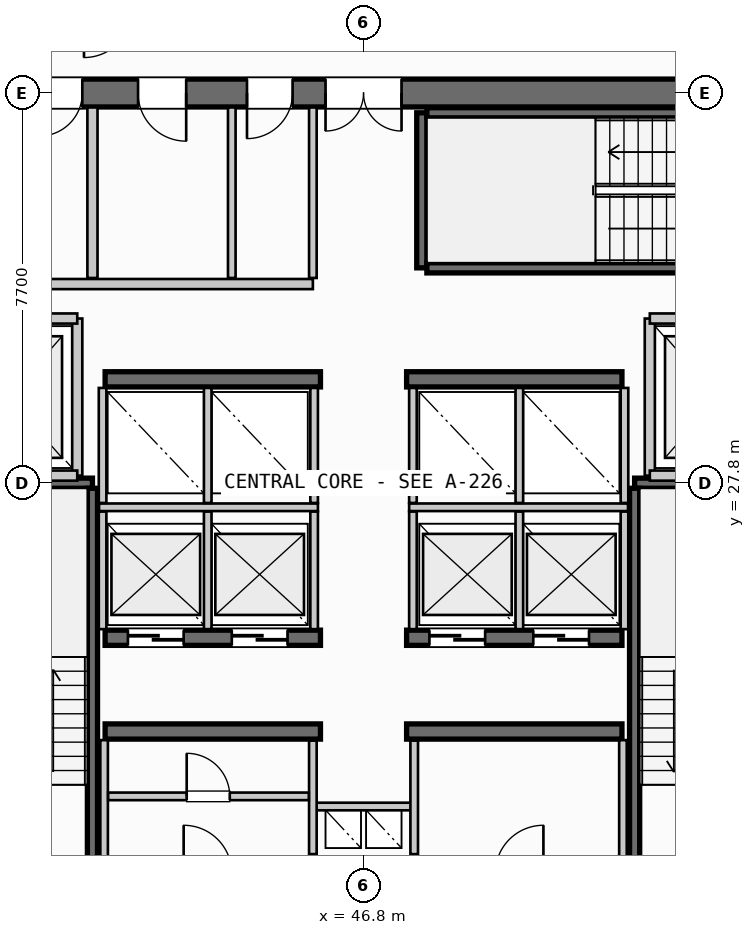
"""IFC4 building model, lengths in metres.
Left out: names, types, materials, properties, quantities, classifications, styles, units other than length and angle.
Written with IfcOpenShell. Run it as: python <this file> out.ifc"""

import sys

from ifc_helpers import new_model, si_unit, direction, frame, frame_2d, origin, place, context, subcontext, project, spatial, rectangle, extrude, source, transform, mapped, element, fill, save


model = new_model("IFC4")
c1 = context("Model", 3, precision=1e-05, world=origin(), true_north=direction((0.0, 1.0)))
c2 = subcontext(c1, "Body", "Model", "MODEL_VIEW")
j1 = project(units=[si_unit("LENGTHUNIT", "METRE"), si_unit("PLANEANGLEUNIT", "RADIAN")], contexts=[c1])
p1 = place(None, origin())
s1 = spatial("IfcSite", under=j1, at=p1, CompositionType="ELEMENT")
p2 = place(p1, origin())
s2 = spatial("IfcBuilding", under=s1, at=p2, CompositionType="ELEMENT")
p3 = place(p2, frame((0.0, 0.0, 186.9)))
s3 = spatial("IfcBuildingStorey", under=s2, at=p3, CompositionType="ELEMENT", Elevation=186.9)
p4 = place(p3, frame((55.6, 35.5, 0.0), z_axis=(0.0, 0.0, 1.0), x_axis=(-1.0, 0.0, 0.0)))
e1 = element("IfcWall", 1, at=p4, inside=s3, PredefinedType="SHEAR", context=c2, shape_type="SweptSolid", body=[
    extrude(rectangle(XDim=17.6, YDim=0.55, at=frame_2d((8.8, 0.0))), origin(), (0.0, 0.0, 1.0), 3.26),
])
p5 = place(p4, frame((8.05, 0.0, 0.0)))
e2 = element("IfcOpeningElement", 2, at=p5, cuts=e1, PredefinedType="OPENING", context=c2, shape_type="SweptSolid", body=[
    extrude(rectangle(XDim=1.5, YDim=2.2, at=frame_2d((0.75, 1.1))), frame((0.0, 0.285, 0.0), z_axis=(0.0, -1.0, 0.0), x_axis=(1.0, 0.0, 0.0)), (0.0, 0.0, 1.0), 0.57),
])
p6 = place(p4, frame((15.85, 0.0, 0.0)))
e3 = element("IfcOpeningElement", 3, at=p6, cuts=e1, PredefinedType="OPENING", context=c2, shape_type="SweptSolid", body=[
    extrude(rectangle(XDim=0.85, YDim=2.15, at=frame_2d((0.425, 1.075))), frame((0.0, 0.285, 0.0), z_axis=(0.0, -1.0, 0.0), x_axis=(1.0, 0.0, 0.0)), (0.0, 0.0, 1.0), 0.57),
])
p7 = place(p4, frame((14.35, 0.0, 0.0)))
e4 = element("IfcOpeningElement", 4, at=p7, cuts=e1, PredefinedType="OPENING", context=c2, shape_type="SweptSolid", body=[
    extrude(rectangle(XDim=0.85, YDim=2.15, at=frame_2d((0.425, 1.075))), frame((0.0, 0.285, 0.0), z_axis=(0.0, -1.0, 0.0), x_axis=(1.0, 0.0, 0.0)), (0.0, 0.0, 1.0), 0.57),
])
p8 = place(p4, frame((12.3, 0.0, 0.0)))
e5 = element("IfcOpeningElement", 5, at=p8, cuts=e1, PredefinedType="OPENING", context=c2, shape_type="SweptSolid", body=[
    extrude(rectangle(XDim=0.95, YDim=2.15, at=frame_2d((0.475, 1.075))), frame((0.0, 0.285, 0.0), z_axis=(0.0, -1.0, 0.0), x_axis=(1.0, 0.0, 0.0)), (0.0, 0.0, 1.0), 0.57),
])
p9 = place(p4, frame((10.2, 0.0, 0.0)))
e6 = element("IfcOpeningElement", 6, at=p9, cuts=e1, PredefinedType="OPENING", context=c2, shape_type="SweptSolid", body=[
    extrude(rectangle(XDim=0.9, YDim=2.15, at=frame_2d((0.45, 1.075))), frame((0.0, 0.285, 0.0), z_axis=(0.0, -1.0, 0.0), x_axis=(1.0, 0.0, 0.0)), (0.0, 0.0, 1.0), 0.57),
])
for number, where, z_axis, x_axis in (
    (7, (41.7, 22.9, 0.0), (0.0, 0.0, 1.0), (1.0, 0.0, 0.0)),
    (8, (47.65, 22.9, 0.0), (0.0, 0.0, 1.0), (1.0, 0.0, 0.0)),
):
    element("IfcWall", number, at=place(p3, frame(where, z_axis=z_axis, x_axis=x_axis)), inside=s3, PredefinedType="SHEAR", context=c2, shape_type="SweptSolid", body=[
        extrude(rectangle(XDim=4.25, YDim=0.3, at=frame_2d((2.125, 0.0))), origin(), (0.0, 0.0, 1.0), 3.26),
    ])
p10 = place(p3, frame((41.7, 24.75, 0.0), z_axis=(0.0, 0.0, 1.0), x_axis=(1.0, 0.0, 0.0)))
e9 = element("IfcWall", 9, at=p10, inside=s3, PredefinedType="SHEAR", context=c2, shape_type="SweptSolid", body=[
    extrude(rectangle(XDim=4.25, YDim=0.3, at=frame_2d((2.125, 0.0))), origin(), (0.0, 0.0, 1.0), 3.26),
])
p11 = place(p10, frame((0.45, 0.0, 0.0)))
e10 = element("IfcOpeningElement", 10, at=p11, cuts=e9, PredefinedType="OPENING", context=c2, shape_type="SweptSolid", body=[
    extrude(rectangle(XDim=1.1, YDim=2.2, at=frame_2d((0.55, 1.1))), frame((0.0, 0.16, 0.0), z_axis=(0.0, -1.0, 0.0), x_axis=(1.0, 0.0, 0.0)), (0.0, 0.0, 1.0), 0.32),
])
p12 = place(p10, frame((2.5, 0.0, 0.0)))
e11 = element("IfcOpeningElement", 11, at=p12, cuts=e9, PredefinedType="OPENING", context=c2, shape_type="SweptSolid", body=[
    extrude(rectangle(XDim=1.1, YDim=2.2, at=frame_2d((0.55, 1.1))), frame((0.0, 0.16, 0.0), z_axis=(0.0, -1.0, 0.0), x_axis=(1.0, 0.0, 0.0)), (0.0, 0.0, 1.0), 0.32),
])
p13 = place(p3, frame((47.65, 24.75, 0.0), z_axis=(0.0, 0.0, 1.0), x_axis=(1.0, 0.0, 0.0)))
e12 = element("IfcWall", 12, at=p13, inside=s3, PredefinedType="SHEAR", context=c2, shape_type="SweptSolid", body=[
    extrude(rectangle(XDim=4.25, YDim=0.3, at=frame_2d((2.125, 0.0))), origin(), (0.0, 0.0, 1.0), 3.26),
])
p14 = place(p13, frame((0.45, 0.0, 0.0)))
e13 = element("IfcOpeningElement", 13, at=p14, cuts=e12, PredefinedType="OPENING", context=c2, shape_type="SweptSolid", body=[
    extrude(rectangle(XDim=1.1, YDim=2.2, at=frame_2d((0.55, 1.1))), frame((0.0, 0.16, 0.0), z_axis=(0.0, -1.0, 0.0), x_axis=(1.0, 0.0, 0.0)), (0.0, 0.0, 1.0), 0.32),
])
p15 = place(p13, frame((2.5, 0.0, 0.0)))
e14 = element("IfcOpeningElement", 14, at=p15, cuts=e12, PredefinedType="OPENING", context=c2, shape_type="SweptSolid", body=[
    extrude(rectangle(XDim=1.1, YDim=2.2, at=frame_2d((0.55, 1.1))), frame((0.0, 0.16, 0.0), z_axis=(0.0, -1.0, 0.0), x_axis=(1.0, 0.0, 0.0)), (0.0, 0.0, 1.0), 0.32),
])
for number, where, z_axis, x_axis in (
    (15, (41.7, 29.85, 0.0), (0.0, 0.0, 1.0), (1.0, 0.0, 0.0)),
    (16, (47.65, 29.85, 0.0), (0.0, 0.0, 1.0), (1.0, 0.0, 0.0)),
):
    element("IfcWall", number, at=place(p3, frame(where, z_axis=z_axis, x_axis=x_axis)), inside=s3, PredefinedType="SHEAR", context=c2, shape_type="SweptSolid", body=[
        extrude(rectangle(XDim=4.25, YDim=0.3, at=frame_2d((2.125, 0.0))), origin(), (0.0, 0.0, 1.0), 3.26),
    ])
p16 = place(p3, frame((38.39, 27.8, 0.0), z_axis=(0.0, 0.0, 1.0), x_axis=(1.0, 0.0, 0.0)))
e17 = element("IfcWall", 17, at=p16, inside=s3, PredefinedType="SHEAR", context=c2, shape_type="SweptSolid", body=[
    extrude(rectangle(XDim=3.06, YDim=0.2, at=frame_2d((1.53, 0.0))), origin(), (0.0, 0.0, 1.0), 3.26),
])
p17 = place(p3, frame((41.45, 27.7, 0.0), z_axis=(0.0, 0.0, 1.0), x_axis=(0.0, -1.0, 0.0)))
e18 = element("IfcWall", 18, at=p17, inside=s3, PredefinedType="SHEAR", context=c2, shape_type="SweptSolid", body=[
    extrude(rectangle(XDim=7.35, YDim=0.2, at=frame_2d((3.675, 0.0))), origin(), (0.0, 0.0, 1.0), 3.26),
])
p18 = place(p3, frame((52.15, 27.8, 0.0), z_axis=(0.0, 0.0, 1.0), x_axis=(1.0, 0.0, 0.0)))
e19 = element("IfcWall", 19, at=p18, inside=s3, PredefinedType="SHEAR", context=c2, shape_type="SweptSolid", body=[
    extrude(rectangle(XDim=3.06, YDim=0.2, at=frame_2d((1.53, 0.0))), origin(), (0.0, 0.0, 1.0), 3.26),
])
p19 = place(p3, frame((52.15, 20.35, 0.0), z_axis=(0.0, 0.0, 1.0), x_axis=(0.0, 1.0, 0.0)))
e20 = element("IfcWall", 20, at=p19, inside=s3, PredefinedType="SHEAR", context=c2, shape_type="SweptSolid", body=[
    extrude(rectangle(XDim=7.35, YDim=0.2, at=frame_2d((3.675, 0.0))), origin(), (0.0, 0.0, 1.0), 3.26),
])
p20 = place(p3, frame((47.95, 32.05, 0.0), z_axis=(0.0, 0.0, 1.0), x_axis=(0.0, 1.0, 0.0)))
e21 = element("IfcWall", 21, at=p20, inside=s3, PredefinedType="SHEAR", context=c2, shape_type="SweptSolid", body=[
    extrude(rectangle(XDim=3.06, YDim=0.2, at=frame_2d((1.53, 0.0))), origin(), (0.0, 0.0, 1.0), 3.26),
])
for number, where, z_axis, x_axis in (
    (22, (48.05, 35.11, 0.0), (0.0, 0.0, 1.0), (1.0, 0.0, 0.0)),
    (23, (55.4, 32.05, 0.0), (0.0, 0.0, 1.0), (-1.0, 0.0, 0.0)),
):
    element("IfcWall", number, at=place(p3, frame(where, z_axis=z_axis, x_axis=x_axis)), inside=s3, PredefinedType="SHEAR", context=c2, shape_type="SweptSolid", body=[
        extrude(rectangle(XDim=7.35, YDim=0.2, at=frame_2d((3.675, 0.0))), origin(), (0.0, 0.0, 1.0), 3.26),
    ])
p21 = place(p3, frame((45.8, 21.42, 0.0), z_axis=(0.0, 0.0, 1.0), x_axis=(1.0, 0.0, 0.0)))
e24 = element("IfcWall", 24, at=p21, inside=s3, PredefinedType="PARTITIONING", context=c2, shape_type="SweptSolid", body=[
    extrude(rectangle(XDim=2.0, YDim=0.15, at=frame_2d((1.0, 0.0))), origin(), (0.0, 0.0, 1.0), 2.735),
])
for number, where, z_axis, x_axis in (
    (25, (45.8, 20.48, 0.0), (0.0, 0.0, 1.0), (0.0, 1.0, 0.0)),
    (26, (47.8, 20.48, 0.0), (0.0, 0.0, 1.0), (0.0, 1.0, 0.0)),
):
    element("IfcWall", number, at=place(p3, frame(where, z_axis=z_axis, x_axis=x_axis)), inside=s3, PredefinedType="PARTITIONING", context=c2, shape_type="SweptSolid", body=[
        extrude(rectangle(XDim=2.24, YDim=0.15, at=frame_2d((1.12, 0.0))), origin(), (0.0, 0.0, 1.0), 2.735),
    ])
p22 = place(p3, frame((41.15, 27.95, 0.0), z_axis=(0.0, 0.0, 1.0), x_axis=(0.0, 1.0, 0.0)))
e27 = element("IfcWall", 27, at=p22, inside=s3, PredefinedType="PARTITIONING", context=c2, shape_type="SweptSolid", body=[
    extrude(rectangle(XDim=3.1, YDim=0.2, at=frame_2d((1.55, 0.0))), origin(), (0.0, 0.0, 1.0), 2.735),
])
for number, where, z_axis, x_axis in (
    (28, (38.285, 27.95, 0.0), (0.0, 0.0, 1.0), (1.0, 0.0, 0.0)),
    (29, (38.285, 31.05, 0.0), (0.0, 0.0, 1.0), (1.0, 0.0, 0.0)),
):
    element("IfcWall", number, at=place(p3, frame(where, z_axis=z_axis, x_axis=x_axis)), inside=s3, PredefinedType="PARTITIONING", context=c2, shape_type="SweptSolid", body=[
        extrude(rectangle(XDim=2.865, YDim=0.2, at=frame_2d((1.433, 0.0))), origin(), (0.0, 0.0, 1.0), 2.735),
    ])
p23 = place(p3, frame((52.45, 27.95, 0.0), z_axis=(0.0, 0.0, 1.0), x_axis=(0.0, 1.0, 0.0)))
e30 = element("IfcWall", 30, at=p23, inside=s3, PredefinedType="PARTITIONING", context=c2, shape_type="SweptSolid", body=[
    extrude(rectangle(XDim=3.1, YDim=0.2, at=frame_2d((1.55, 0.0))), origin(), (0.0, 0.0, 1.0), 2.735),
])
for number, where, z_axis, x_axis in (
    (31, (52.45, 27.95, 0.0), (0.0, 0.0, 1.0), (1.0, 0.0, 0.0)),
    (32, (52.45, 31.05, 0.0), (0.0, 0.0, 1.0), (1.0, 0.0, 0.0)),
):
    element("IfcWall", number, at=place(p3, frame(where, z_axis=z_axis, x_axis=x_axis)), inside=s3, PredefinedType="PARTITIONING", context=c2, shape_type="SweptSolid", body=[
        extrude(rectangle(XDim=2.865, YDim=0.2, at=frame_2d((1.433, 0.0))), origin(), (0.0, 0.0, 1.0), 2.735),
    ])
for number, where, z_axis, x_axis in (
    (33, (41.68, 20.385, 0.0), (0.0, 0.0, 1.0), (0.0, 1.0, 0.0)),
    (34, (51.92, 20.385, 0.0), (0.0, 0.0, 1.0), (0.0, 1.0, 0.0)),
):
    element("IfcWall", number, at=place(p3, frame(where, z_axis=z_axis, x_axis=x_axis)), inside=s3, PredefinedType="PARTITIONING", context=c2, shape_type="SweptSolid", body=[
        extrude(rectangle(XDim=2.345, YDim=0.15, at=frame_2d((1.172, 0.0))), origin(), (0.0, 0.0, 1.0), 2.735),
    ])
p24 = place(p3, frame((41.76, 21.62, 0.0), z_axis=(0.0, 0.0, 1.0), x_axis=(1.0, 0.0, 0.0)))
e35 = element("IfcWall", 35, at=p24, inside=s3, PredefinedType="PARTITIONING", context=c2, shape_type="SweptSolid", body=[
    extrude(rectangle(XDim=3.96, YDim=0.15, at=frame_2d((1.98, 0.0))), origin(), (0.0, 0.0, 1.0), 2.735),
])
p25 = place(p24, frame((1.55, 0.0, 0.0)))
e36 = element("IfcOpeningElement", 36, at=p25, cuts=e35, PredefinedType="OPENING", context=c2, shape_type="SweptSolid", body=[
    extrude(rectangle(XDim=0.85, YDim=2.15, at=frame_2d((0.425, 1.075))), frame((0.0, 0.085, 0.0), z_axis=(0.0, -1.0, 0.0), x_axis=(1.0, 0.0, 0.0)), (0.0, 0.0, 1.0), 0.17),
])
p26 = place(p3, frame((41.58, 27.325, 0.0), z_axis=(0.0, 0.0, 1.0), x_axis=(1.0, 0.0, 0.0)))
e37 = element("IfcWall", 37, at=p26, inside=s3, PredefinedType="PARTITIONING", context=c2, shape_type="SweptSolid", body=[
    extrude(rectangle(XDim=4.32, YDim=0.15, at=frame_2d((2.16, 0.0))), origin(), (0.0, 0.0, 1.0), 2.735),
])
p27 = place(p3, frame((47.7, 27.325, 0.0), z_axis=(0.0, 0.0, 1.0), x_axis=(1.0, 0.0, 0.0)))
e38 = element("IfcWall", 38, at=p27, inside=s3, PredefinedType="PARTITIONING", context=c2, shape_type="SweptSolid", body=[
    extrude(rectangle(XDim=4.32, YDim=0.15, at=frame_2d((2.16, 0.0))), origin(), (0.0, 0.0, 1.0), 2.735),
])
for number, where, z_axis, x_axis in (
    (39, (41.65, 24.92, 0.0), (0.0, 0.0, 1.0), (0.0, 1.0, 0.0)),
    (40, (43.725, 24.92, 0.0), (0.0, 0.0, 1.0), (0.0, 1.0, 0.0)),
    (41, (45.825, 24.92, 0.0), (0.0, 0.0, 1.0), (0.0, 1.0, 0.0)),
    (42, (47.775, 24.92, 0.0), (0.0, 0.0, 1.0), (0.0, 1.0, 0.0)),
    (43, (49.875, 24.92, 0.0), (0.0, 0.0, 1.0), (0.0, 1.0, 0.0)),
    (44, (51.95, 24.92, 0.0), (0.0, 0.0, 1.0), (0.0, 1.0, 0.0)),
):
    element("IfcWall", number, at=place(p3, frame(where, z_axis=z_axis, x_axis=x_axis)), inside=s3, PredefinedType="PARTITIONING", context=c2, shape_type="SweptSolid", body=[
        extrude(rectangle(XDim=2.32, YDim=0.15, at=frame_2d((1.16, 0.0))), origin(), (0.0, 0.0, 1.0), 2.735),
    ])
for number, where, z_axis, x_axis in (
    (45, (41.65, 27.41, 0.0), (0.0, 0.0, 1.0), (0.0, 1.0, 0.0)),
    (46, (43.725, 27.41, 0.0), (0.0, 0.0, 1.0), (0.0, 1.0, 0.0)),
    (47, (45.825, 27.41, 0.0), (0.0, 0.0, 1.0), (0.0, 1.0, 0.0)),
    (48, (47.775, 27.41, 0.0), (0.0, 0.0, 1.0), (0.0, 1.0, 0.0)),
    (49, (49.875, 27.41, 0.0), (0.0, 0.0, 1.0), (0.0, 1.0, 0.0)),
    (50, (51.95, 27.41, 0.0), (0.0, 0.0, 1.0), (0.0, 1.0, 0.0)),
):
    element("IfcWall", number, at=place(p3, frame(where, z_axis=z_axis, x_axis=x_axis)), inside=s3, PredefinedType="PARTITIONING", context=c2, shape_type="SweptSolid", body=[
        extrude(rectangle(XDim=2.27, YDim=0.15, at=frame_2d((1.135, 0.0))), origin(), (0.0, 0.0, 1.0), 2.735),
    ])
p28 = place(p3, frame((41.45, 31.85, 0.0), z_axis=(0.0, 0.0, 1.0), x_axis=(0.0, 1.0, 0.0)))
e51 = element("IfcWall", 51, at=p28, inside=s3, PredefinedType="PARTITIONING", context=c2, shape_type="SweptSolid", body=[
    extrude(rectangle(XDim=3.365, YDim=0.2, at=frame_2d((1.683, 0.0))), origin(), (0.0, 0.0, 1.0), 2.735),
])
p29 = place(p3, frame((38.285, 31.73, 0.0), z_axis=(0.0, 0.0, 1.0), x_axis=(1.0, 0.0, 0.0)))
e52 = element("IfcWall", 52, at=p29, inside=s3, PredefinedType="PARTITIONING", context=c2, shape_type="SweptSolid", body=[
    extrude(rectangle(XDim=7.515, YDim=0.2, at=frame_2d((3.758, 0.0))), origin(), (0.0, 0.0, 1.0), 2.735),
])
p30 = place(p3, frame((45.8, 31.85, 0.0), z_axis=(0.0, 0.0, 1.0), x_axis=(0.0, 1.0, 0.0)))
e53 = element("IfcWall", 53, at=p30, inside=s3, PredefinedType="PARTITIONING", context=c2, shape_type="SweptSolid", body=[
    extrude(rectangle(XDim=3.365, YDim=0.15, at=frame_2d((1.683, 0.0))), origin(), (0.0, 0.0, 1.0), 2.735),
])
p31 = place(p3, frame((44.2, 31.85, 0.0), z_axis=(0.0, 0.0, 1.0), x_axis=(0.0, 1.0, 0.0)))
e54 = element("IfcWall", 54, at=p31, inside=s3, PredefinedType="PLUMBINGWALL", context=c2, shape_type="SweptSolid", body=[
    extrude(rectangle(XDim=3.365, YDim=0.15, at=frame_2d((1.683, 0.0))), origin(), (0.0, 0.0, 1.0), 2.735),
])
m1 = source(origin(), c2, "Body", "SweptSolid", [
    extrude(rectangle(XDim=1.5, YDim=2.2, at=frame_2d((0.75, 1.1))), frame((0.0, 0.025, 0.0), z_axis=(0.0, -1.0, 0.0), x_axis=(1.0, 0.0, 0.0)), (0.0, 0.0, 1.0), 0.05),
])
p32 = place(p5, origin())
e55 = element("IfcDoor", 55, at=p32, inside=s3, OperationType="DOUBLE_DOOR_SINGLE_SWING", PredefinedType="DOOR", context=c2, shape_type="MappedRepresentation", body=[
    mapped(m1, transform((0.0, 0.0, 0.0), scale=1.0)),
])
fill(e2, e55)
m2 = source(origin(), c2, "Body", "SweptSolid", [
    extrude(rectangle(XDim=1.1, YDim=2.2, at=frame_2d((0.55, 1.1))), frame((0.0, 0.025, 0.0), z_axis=(0.0, -1.0, 0.0), x_axis=(1.0, 0.0, 0.0)), (0.0, 0.0, 1.0), 0.05),
])
p33 = place(p11, origin())
e56 = element("IfcDoor", 56, at=p33, inside=s3, OperationType="SLIDING_TO_RIGHT", PredefinedType="DOOR", context=c2, shape_type="MappedRepresentation", body=[
    mapped(m2, transform((0.0, 0.0, 0.0), scale=1.0)),
])
fill(e10, e56)
p34 = place(p12, origin())
e57 = element("IfcDoor", 57, at=p34, inside=s3, OperationType="SLIDING_TO_RIGHT", PredefinedType="DOOR", context=c2, shape_type="MappedRepresentation", body=[
    mapped(m2, transform((0.0, 0.0, 0.0), scale=1.0)),
])
fill(e11, e57)
p35 = place(p14, origin())
e58 = element("IfcDoor", 58, at=p35, inside=s3, OperationType="SLIDING_TO_RIGHT", PredefinedType="DOOR", context=c2, shape_type="MappedRepresentation", body=[
    mapped(m2, transform((0.0, 0.0, 0.0), scale=1.0)),
])
fill(e13, e58)
p36 = place(p15, origin())
e59 = element("IfcDoor", 59, at=p36, inside=s3, OperationType="SLIDING_TO_RIGHT", PredefinedType="DOOR", context=c2, shape_type="MappedRepresentation", body=[
    mapped(m2, transform((0.0, 0.0, 0.0), scale=1.0)),
])
fill(e14, e59)
m3 = source(origin(), c2, "Body", "SweptSolid", [
    extrude(rectangle(XDim=0.85, YDim=2.15, at=frame_2d((0.425, 1.075))), frame((0.0, 0.025, 0.0), z_axis=(0.0, -1.0, 0.0), x_axis=(1.0, 0.0, 0.0)), (0.0, 0.0, 1.0), 0.05),
])
p37 = place(p7, origin())
e60 = element("IfcDoor", 60, at=p37, inside=s3, OperationType="SINGLE_SWING_RIGHT", PredefinedType="DOOR", context=c2, shape_type="MappedRepresentation", body=[
    mapped(m3, transform((0.0, 0.0, 0.0), scale=1.0)),
])
fill(e4, e60)
m4 = source(origin(), c2, "Body", "SweptSolid", [
    extrude(rectangle(XDim=0.95, YDim=2.15, at=frame_2d((0.475, 1.075))), frame((0.0, 0.025, 0.0), z_axis=(0.0, -1.0, 0.0), x_axis=(1.0, 0.0, 0.0)), (0.0, 0.0, 1.0), 0.05),
])
p38 = place(p8, origin())
e61 = element("IfcDoor", 61, at=p38, inside=s3, OperationType="SINGLE_SWING_LEFT", PredefinedType="DOOR", context=c2, shape_type="MappedRepresentation", body=[
    mapped(m4, transform((0.0, 0.0, 0.0), scale=1.0)),
])
fill(e5, e61)
m5 = source(origin(), c2, "Body", "SweptSolid", [
    extrude(rectangle(XDim=0.9, YDim=2.15, at=frame_2d((0.45, 1.075))), frame((0.0, 0.025, 0.0), z_axis=(0.0, -1.0, 0.0), x_axis=(1.0, 0.0, 0.0)), (0.0, 0.0, 1.0), 0.05),
])
p39 = place(p9, origin())
e62 = element("IfcDoor", 62, at=p39, inside=s3, OperationType="SINGLE_SWING_RIGHT", PredefinedType="DOOR", context=c2, shape_type="MappedRepresentation", body=[
    mapped(m5, transform((0.0, 0.0, 0.0), scale=1.0)),
])
fill(e6, e62)
p40 = place(p25, origin())
e63 = element("IfcDoor", 63, at=p40, inside=s3, OperationType="SINGLE_SWING_LEFT", PredefinedType="DOOR", context=c2, shape_type="MappedRepresentation", body=[
    mapped(m3, transform((0.0, 0.0, 0.0), scale=1.0)),
])
fill(e36, e63)
save(model, sys.argv[1])
